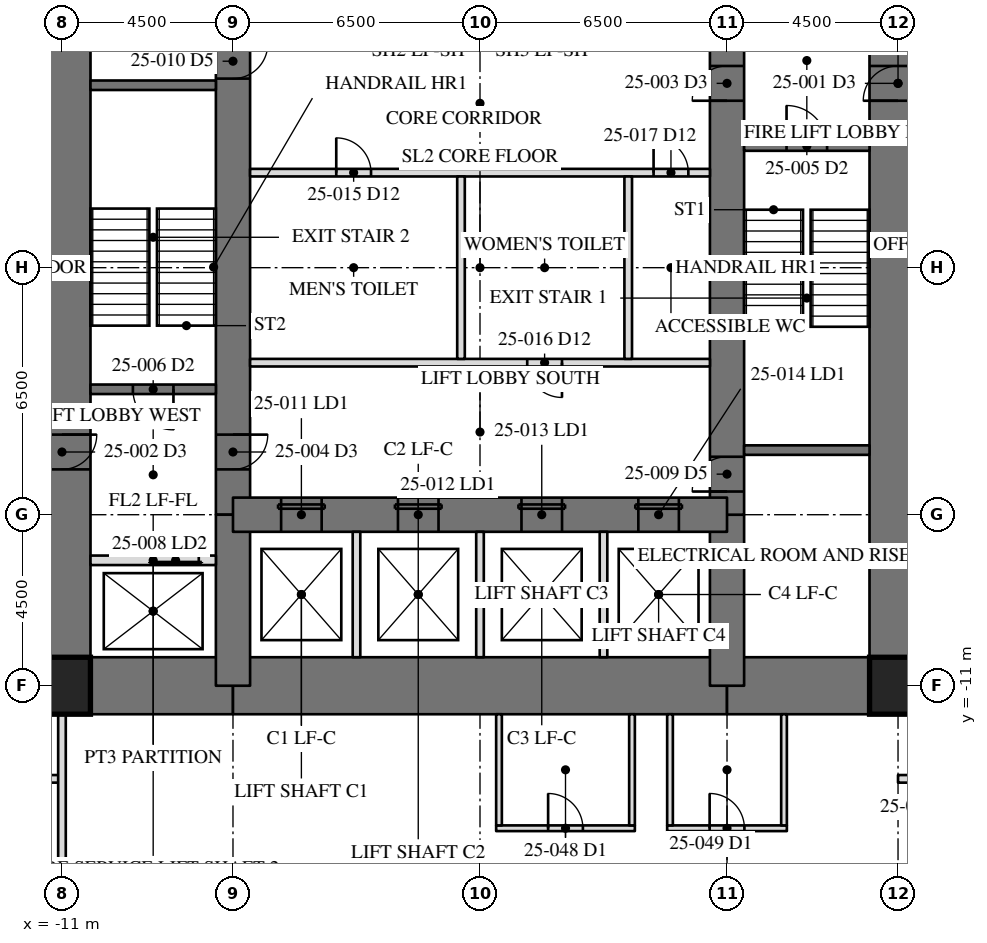
"""IFC4 building model, lengths in metres.
Left out: names, types, materials, properties, quantities, classifications, styles, units other than length and angle.
Written with IfcOpenShell. Run it as: python <this file> out.ifc"""

import sys

from ifc_helpers import new_model, si_unit, direction, frame, frame_2d, origin, origin_2d, place, context, subcontext, project, spatial, rectangle, hollow_rectangle, extrude, element, fill, save


model = new_model("IFC4")
c1 = context("Model", 3, precision=1e-05, world=origin(), true_north=direction((0.0, 1.0)))
c2 = subcontext(c1, "Body", "Model", "MODEL_VIEW")
j1 = project(units=[si_unit("LENGTHUNIT", "METRE"), si_unit("PLANEANGLEUNIT", "RADIAN")], contexts=[c1])
p1 = place(None, origin())
s1 = spatial("IfcSite", under=j1, at=p1, CompositionType="ELEMENT")
p2 = place(p1, origin())
s2 = spatial("IfcBuilding", under=s1, at=p2, CompositionType="ELEMENT")
p3 = place(p2, frame((0.0, 0.0, 109.0)))
s3 = spatial("IfcBuildingStorey", under=s2, at=p3, CompositionType="ELEMENT", Elevation=109.0)
p4 = place(p3, frame((11.0, -11.0, 0.0), z_axis=(0.0, 0.0, 1.0), x_axis=(0.0, 1.0, 0.0)))
e1 = element("IfcWall", 1, at=p4, inside=s3, PredefinedType="SHEAR", context=c2, shape_type="SweptSolid", body=[
    extrude(rectangle(XDim=22.0, YDim=1.5, at=frame_2d((11.0, 0.0))), origin(), (0.0, 0.0, 1.0), 4.1),
])
p5 = place(p4, frame((15.393, 0.0, 0.0)))
e2 = element("IfcOpeningElement", 2, at=p5, cuts=e1, PredefinedType="OPENING", context=c2, shape_type="SweptSolid", body=[
    extrude(rectangle(XDim=0.915, YDim=2.134, at=frame_2d((0.458, 1.067))), frame((0.0, 0.76, 0.0), z_axis=(0.0, -1.0, 0.0), x_axis=(1.0, 0.0, 0.0)), (0.0, 0.0, 1.0), 1.52),
])
p6 = place(p3, frame((-11.0, 11.0, 0.0), z_axis=(0.0, 0.0, 1.0), x_axis=(0.0, -1.0, 0.0)))
e3 = element("IfcWall", 3, at=p6, inside=s3, PredefinedType="SHEAR", context=c2, shape_type="SweptSolid", body=[
    extrude(rectangle(XDim=22.0, YDim=1.5, at=frame_2d((11.0, 0.0))), origin(), (0.0, 0.0, 1.0), 4.1),
])
p7 = place(p6, frame((15.393, 0.0, 0.0)))
e4 = element("IfcOpeningElement", 4, at=p7, cuts=e3, PredefinedType="OPENING", context=c2, shape_type="SweptSolid", body=[
    extrude(rectangle(XDim=0.915, YDim=2.134, at=frame_2d((0.458, 1.067))), frame((0.0, 0.76, 0.0), z_axis=(0.0, -1.0, 0.0), x_axis=(1.0, 0.0, 0.0)), (0.0, 0.0, 1.0), 1.52),
])
p8 = place(p3, frame((-11.0, -11.0, 0.0), z_axis=(0.0, 0.0, 1.0), x_axis=(1.0, 0.0, 0.0)))
e5 = element("IfcWall", 5, at=p8, inside=s3, PredefinedType="SHEAR", context=c2, shape_type="SweptSolid", body=[
    extrude(rectangle(XDim=4.5, YDim=1.5, at=frame_2d((2.25, 0.0))), origin(), (0.0, 0.0, 1.0), 4.1),
])
p9 = place(p3, frame((-6.5, -11.0, 0.0), z_axis=(0.0, 0.0, 1.0), x_axis=(1.0, 0.0, 0.0)))
e6 = element("IfcWall", 6, at=p9, inside=s3, PredefinedType="SHEAR", context=c2, shape_type="SweptSolid", body=[
    extrude(rectangle(XDim=13.0, YDim=1.5, at=frame_2d((6.5, 0.0))), origin(), (0.0, 0.0, 1.0), 4.1),
])
p10 = place(p3, frame((6.5, -11.0, 0.0), z_axis=(0.0, 0.0, 1.0), x_axis=(1.0, 0.0, 0.0)))
e7 = element("IfcWall", 7, at=p10, inside=s3, PredefinedType="SHEAR", context=c2, shape_type="SweptSolid", body=[
    extrude(rectangle(XDim=4.5, YDim=1.5, at=frame_2d((2.25, 0.0))), origin(), (0.0, 0.0, 1.0), 4.1),
])
p11 = place(p3, frame((6.5, -11.0, 0.0), z_axis=(0.0, 0.0, 1.0), x_axis=(0.0, 1.0, 0.0)))
e8 = element("IfcWall", 8, at=p11, inside=s3, PredefinedType="SHEAR", context=c2, shape_type="SweptSolid", body=[
    extrude(rectangle(XDim=4.5, YDim=0.9, at=frame_2d((2.25, 0.0))), origin(), (0.0, 0.0, 1.0), 4.1),
])
p12 = place(p3, frame((6.5, -6.5, 0.0), z_axis=(0.0, 0.0, 1.0), x_axis=(0.0, 1.0, 0.0)))
e9 = element("IfcWall", 9, at=p12, inside=s3, PredefinedType="SHEAR", context=c2, shape_type="SweptSolid", body=[
    extrude(rectangle(XDim=13.0, YDim=0.9, at=frame_2d((6.5, 0.0))), origin(), (0.0, 0.0, 1.0), 4.1),
])
p13 = place(p12, frame((10.893, 0.0, 0.0)))
e10 = element("IfcOpeningElement", 10, at=p13, cuts=e9, PredefinedType="OPENING", context=c2, shape_type="SweptSolid", body=[
    extrude(rectangle(XDim=0.915, YDim=2.134, at=frame_2d((0.458, 1.067))), frame((0.0, 0.46, 0.0), z_axis=(0.0, -1.0, 0.0), x_axis=(1.0, 0.0, 0.0)), (0.0, 0.0, 1.0), 0.92),
])
p14 = place(p12, frame((0.61, 0.0, 0.0)))
e11 = element("IfcOpeningElement", 11, at=p14, cuts=e9, PredefinedType="OPENING", context=c2, shape_type="SweptSolid", body=[
    extrude(rectangle(XDim=0.915, YDim=2.134, at=frame_2d((0.458, 1.067))), frame((0.0, 0.46, 0.0), z_axis=(0.0, -1.0, 0.0), x_axis=(1.0, 0.0, 0.0)), (0.0, 0.0, 1.0), 0.92),
])
p15 = place(p3, frame((-6.5, 6.5, 0.0), z_axis=(0.0, 0.0, 1.0), x_axis=(0.0, -1.0, 0.0)))
e12 = element("IfcWall", 12, at=p15, inside=s3, PredefinedType="SHEAR", context=c2, shape_type="SweptSolid", body=[
    extrude(rectangle(XDim=13.0, YDim=0.9, at=frame_2d((6.5, 0.0))), origin(), (0.0, 0.0, 1.0), 4.1),
])
p16 = place(p15, frame((10.893, 0.0, 0.0)))
e13 = element("IfcOpeningElement", 13, at=p16, cuts=e12, PredefinedType="OPENING", context=c2, shape_type="SweptSolid", body=[
    extrude(rectangle(XDim=0.915, YDim=2.134, at=frame_2d((0.458, 1.067))), frame((0.0, 0.46, 0.0), z_axis=(0.0, -1.0, 0.0), x_axis=(1.0, 0.0, 0.0)), (0.0, 0.0, 1.0), 0.92),
])
p17 = place(p15, frame((0.61, 0.0, 0.0)))
e14 = element("IfcOpeningElement", 14, at=p17, cuts=e12, PredefinedType="OPENING", context=c2, shape_type="SweptSolid", body=[
    extrude(rectangle(XDim=0.915, YDim=2.134, at=frame_2d((0.458, 1.067))), frame((0.0, 0.46, 0.0), z_axis=(0.0, -1.0, 0.0), x_axis=(1.0, 0.0, 0.0)), (0.0, 0.0, 1.0), 0.92),
])
p18 = place(p3, frame((-6.5, -6.5, 0.0), z_axis=(0.0, 0.0, 1.0), x_axis=(0.0, -1.0, 0.0)))
e15 = element("IfcWall", 15, at=p18, inside=s3, PredefinedType="SHEAR", context=c2, shape_type="SweptSolid", body=[
    extrude(rectangle(XDim=4.5, YDim=0.9, at=frame_2d((2.25, 0.0))), origin(), (0.0, 0.0, 1.0), 4.1),
])
p19 = place(p3, frame((-6.5, -6.5, 0.0), z_axis=(0.0, 0.0, 1.0), x_axis=(1.0, 0.0, 0.0)))
e16 = element("IfcWall", 16, at=p19, inside=s3, PredefinedType="SHEAR", context=c2, shape_type="SweptSolid", body=[
    extrude(rectangle(XDim=13.0, YDim=0.9, at=frame_2d((6.5, 0.0))), origin(), (0.0, 0.0, 1.0), 4.1),
])
p20 = place(p19, frame((1.267, 0.0, 0.0)))
e17 = element("IfcOpeningElement", 17, at=p20, cuts=e16, PredefinedType="OPENING", context=c2, shape_type="SweptSolid", body=[
    extrude(rectangle(XDim=1.067, YDim=2.134, at=frame_2d((0.533, 1.067))), frame((0.0, 0.46, 0.0), z_axis=(0.0, -1.0, 0.0), x_axis=(1.0, 0.0, 0.0)), (0.0, 0.0, 1.0), 0.92),
])
p21 = place(p19, frame((4.342, 0.0, 0.0)))
e18 = element("IfcOpeningElement", 18, at=p21, cuts=e16, PredefinedType="OPENING", context=c2, shape_type="SweptSolid", body=[
    extrude(rectangle(XDim=1.067, YDim=2.134, at=frame_2d((0.533, 1.067))), frame((0.0, 0.46, 0.0), z_axis=(0.0, -1.0, 0.0), x_axis=(1.0, 0.0, 0.0)), (0.0, 0.0, 1.0), 0.92),
])
p22 = place(p19, frame((7.592, 0.0, 0.0)))
e19 = element("IfcOpeningElement", 19, at=p22, cuts=e16, PredefinedType="OPENING", context=c2, shape_type="SweptSolid", body=[
    extrude(rectangle(XDim=1.067, YDim=2.134, at=frame_2d((0.533, 1.067))), frame((0.0, 0.46, 0.0), z_axis=(0.0, -1.0, 0.0), x_axis=(1.0, 0.0, 0.0)), (0.0, 0.0, 1.0), 0.92),
])
p23 = place(p19, frame((10.667, 0.0, 0.0)))
e20 = element("IfcOpeningElement", 20, at=p23, cuts=e16, PredefinedType="OPENING", context=c2, shape_type="SweptSolid", body=[
    extrude(rectangle(XDim=1.067, YDim=2.134, at=frame_2d((0.533, 1.067))), frame((0.0, 0.46, 0.0), z_axis=(0.0, -1.0, 0.0), x_axis=(1.0, 0.0, 0.0)), (0.0, 0.0, 1.0), 0.92),
])
for number, where, z_axis, x_axis in (
    (21, (-11.0, -11.0, 0.0), (0.0, 0.0, 1.0), (1.0, 0.0, 0.0)),
    (22, (11.0, -11.0, 0.0), (0.0, 0.0, 1.0), (1.0, 0.0, 0.0)),
):
    element("IfcColumn", number, at=place(p3, frame(where, z_axis=z_axis, x_axis=x_axis)), inside=s3, PredefinedType="COLUMN", context=c2, shape_type="SweptSolid", body=[
        extrude(hollow_rectangle(XDim=1.499, YDim=1.499, WallThickness=0.102, at=origin_2d()), origin(), (0.0, 0.0, 1.0), 4.1),
    ])
for number, where, z_axis, x_axis in (
    (23, (6.95, -4.8, 0.0), (0.0, 0.0, 1.0), (1.0, 0.0, 0.0)),
    (24, (-6.95, 4.8, 0.0), (0.0, 0.0, 1.0), (-1.0, 0.0, 0.0)),
):
    element("IfcWall", number, at=place(p3, frame(where, z_axis=z_axis, x_axis=x_axis)), inside=s3, PredefinedType="SOLIDWALL", context=c2, shape_type="SweptSolid", body=[
        extrude(rectangle(XDim=3.3, YDim=0.25, at=frame_2d((1.65, 0.0))), origin(), (0.0, 0.0, 1.0), 3.91),
    ])
p24 = place(p3, frame((6.95, 3.2, 0.0), z_axis=(0.0, 0.0, 1.0), x_axis=(1.0, 0.0, 0.0)))
e25 = element("IfcWall", 25, at=p24, inside=s3, PredefinedType="SOLIDWALL", context=c2, shape_type="SweptSolid", body=[
    extrude(rectangle(XDim=3.3, YDim=0.25, at=frame_2d((1.65, 0.0))), origin(), (0.0, 0.0, 1.0), 3.91),
])
p25 = place(p24, frame((1.116, 0.0, 0.0)))
e26 = element("IfcOpeningElement", 26, at=p25, cuts=e25, PredefinedType="OPENING", context=c2, shape_type="SweptSolid", body=[
    extrude(rectangle(XDim=1.067, YDim=2.134, at=frame_2d((0.533, 1.067))), frame((0.0, 0.135, 0.0), z_axis=(0.0, -1.0, 0.0), x_axis=(1.0, 0.0, 0.0)), (0.0, 0.0, 1.0), 0.27),
])
p26 = place(p3, frame((-6.95, -3.2, 0.0), z_axis=(0.0, 0.0, 1.0), x_axis=(-1.0, 0.0, 0.0)))
e27 = element("IfcWall", 27, at=p26, inside=s3, PredefinedType="SOLIDWALL", context=c2, shape_type="SweptSolid", body=[
    extrude(rectangle(XDim=3.3, YDim=0.25, at=frame_2d((1.65, 0.0))), origin(), (0.0, 0.0, 1.0), 3.91),
])
p27 = place(p26, frame((1.116, 0.0, 0.0)))
e28 = element("IfcOpeningElement", 28, at=p27, cuts=e27, PredefinedType="OPENING", context=c2, shape_type="SweptSolid", body=[
    extrude(rectangle(XDim=1.067, YDim=2.134, at=frame_2d((0.533, 1.067))), frame((0.0, 0.135, 0.0), z_axis=(0.0, -1.0, 0.0), x_axis=(1.0, 0.0, 0.0)), (0.0, 0.0, 1.0), 0.27),
])
p28 = place(p3, frame((-6.95, -7.7, 0.0), z_axis=(0.0, 0.0, 1.0), x_axis=(-1.0, 0.0, 0.0)))
e29 = element("IfcWall", 29, at=p28, inside=s3, PredefinedType="PARTITIONING", context=c2, shape_type="SweptSolid", body=[
    extrude(rectangle(XDim=3.3, YDim=0.25, at=frame_2d((1.65, 0.0))), origin(), (0.0, 0.0, 1.0), 3.91),
])
p29 = place(p28, frame((0.45, 0.0, 0.0)))
e30 = element("IfcOpeningElement", 30, at=p29, cuts=e29, PredefinedType="OPENING", context=c2, shape_type="SweptSolid", body=[
    extrude(rectangle(XDim=1.219, YDim=2.134, at=frame_2d((0.609, 1.067))), frame((0.0, 0.135, 0.0), z_axis=(0.0, -1.0, 0.0), x_axis=(1.0, 0.0, 0.0)), (0.0, 0.0, 1.0), 0.27),
])
p30 = place(p3, frame((-6.05, 2.5, 0.0), z_axis=(0.0, 0.0, 1.0), x_axis=(1.0, 0.0, 0.0)))
e31 = element("IfcWall", 31, at=p30, inside=s3, PredefinedType="PARTITIONING", context=c2, shape_type="SweptSolid", body=[
    extrude(rectangle(XDim=12.1, YDim=0.2, at=frame_2d((6.05, 0.0))), origin(), (0.0, 0.0, 1.0), 3.91),
])
p31 = place(p30, frame((2.268, 0.0, 0.0)))
e32 = element("IfcOpeningElement", 32, at=p31, cuts=e31, PredefinedType="OPENING", context=c2, shape_type="SweptSolid", body=[
    extrude(rectangle(XDim=0.915, YDim=2.134, at=frame_2d((0.458, 1.067))), frame((0.0, 0.11, 0.0), z_axis=(0.0, -1.0, 0.0), x_axis=(1.0, 0.0, 0.0)), (0.0, 0.0, 1.0), 0.22),
])
p32 = place(p30, frame((10.617, 0.0, 0.0)))
e33 = element("IfcOpeningElement", 33, at=p32, cuts=e31, PredefinedType="OPENING", context=c2, shape_type="SweptSolid", body=[
    extrude(rectangle(XDim=0.915, YDim=2.134, at=frame_2d((0.458, 1.067))), frame((0.0, 0.11, 0.0), z_axis=(0.0, -1.0, 0.0), x_axis=(1.0, 0.0, 0.0)), (0.0, 0.0, 1.0), 0.22),
])
p33 = place(p3, frame((6.05, -2.5, 0.0), z_axis=(0.0, 0.0, 1.0), x_axis=(-1.0, 0.0, 0.0)))
e34 = element("IfcWall", 34, at=p33, inside=s3, PredefinedType="PARTITIONING", context=c2, shape_type="SweptSolid", body=[
    extrude(rectangle(XDim=12.1, YDim=0.2, at=frame_2d((6.05, 0.0))), origin(), (0.0, 0.0, 1.0), 3.91),
])
p34 = place(p33, frame((3.893, 0.0, 0.0)))
e35 = element("IfcOpeningElement", 35, at=p34, cuts=e34, PredefinedType="OPENING", context=c2, shape_type="SweptSolid", body=[
    extrude(rectangle(XDim=0.915, YDim=2.134, at=frame_2d((0.458, 1.067))), frame((0.0, 0.11, 0.0), z_axis=(0.0, -1.0, 0.0), x_axis=(1.0, 0.0, 0.0)), (0.0, 0.0, 1.0), 0.22),
])
for number, where, z_axis, x_axis in (
    (36, (-3.25, -10.25, 0.0), (0.0, 0.0, 1.0), (0.0, 1.0, 0.0)),
    (37, (0.0, -10.25, 0.0), (0.0, 0.0, 1.0), (0.0, 1.0, 0.0)),
    (38, (3.25, -10.25, 0.0), (0.0, 0.0, 1.0), (0.0, 1.0, 0.0)),
):
    element("IfcWall", number, at=place(p3, frame(where, z_axis=z_axis, x_axis=x_axis)), inside=s3, PredefinedType="PARTITIONING", context=c2, shape_type="SweptSolid", body=[
        extrude(rectangle(XDim=3.3, YDim=0.2, at=frame_2d((1.65, 0.0))), origin(), (0.0, 0.0, 1.0), 3.91),
    ])
for number, where, z_axis, x_axis in (
    (39, (-0.5, -2.4, 0.0), (0.0, 0.0, 1.0), (0.0, 1.0, 0.0)),
    (40, (3.9, -2.4, 0.0), (0.0, 0.0, 1.0), (0.0, 1.0, 0.0)),
):
    element("IfcWall", number, at=place(p3, frame(where, z_axis=z_axis, x_axis=x_axis)), inside=s3, PredefinedType="PARTITIONING", context=c2, shape_type="SweptSolid", body=[
        extrude(rectangle(XDim=4.8, YDim=0.2, at=frame_2d((2.4, 0.0))), origin(), (0.0, 0.0, 1.0), 3.91),
    ])
for number, where, z_axis, x_axis in (
    (41, (11.0, -13.45, 0.0), (0.0, 0.0, 1.0), (1.0, 0.0, 0.0)),
    (42, (-11.0, -13.45, 0.0), (0.0, 0.0, 1.0), (-1.0, 0.0, 0.0)),
):
    element("IfcWall", number, at=place(p3, frame(where, z_axis=z_axis, x_axis=x_axis)), inside=s3, PredefinedType="PARTITIONING", context=c2, shape_type="SweptSolid", body=[
        extrude(rectangle(XDim=2.55, YDim=0.2, at=frame_2d((1.275, 0.0))), origin(), (0.0, 0.0, 1.0), 3.91),
    ])
p35 = place(p3, frame((-11.0, -11.75, 0.0), z_axis=(0.0, 0.0, 1.0), x_axis=(0.0, -1.0, 0.0)))
e43 = element("IfcWall", 43, at=p35, inside=s3, PredefinedType="PARTITIONING", context=c2, shape_type="SweptSolid", body=[
    extrude(rectangle(XDim=10.665, YDim=0.2, at=frame_2d((5.333, 0.0))), origin(), (0.0, 0.0, 1.0), 3.326),
])
p36 = place(p3, frame((0.425, -14.75, 0.0), z_axis=(0.0, 0.0, 1.0), x_axis=(1.0, 0.0, 0.0)))
e44 = element("IfcWall", 44, at=p36, inside=s3, PredefinedType="PARTITIONING", context=c2, shape_type="SweptSolid", body=[
    extrude(rectangle(XDim=3.65, YDim=0.15, at=frame_2d((1.825, 0.0))), origin(), (0.0, 0.0, 1.0), 3.91),
])
p37 = place(p36, frame((1.367, 0.0, 0.0)))
e45 = element("IfcOpeningElement", 45, at=p37, cuts=e44, PredefinedType="OPENING", context=c2, shape_type="SweptSolid", body=[
    extrude(rectangle(XDim=0.915, YDim=2.134, at=frame_2d((0.458, 1.067))), frame((0.0, 0.085, 0.0), z_axis=(0.0, -1.0, 0.0), x_axis=(1.0, 0.0, 0.0)), (0.0, 0.0, 1.0), 0.17),
])
for number, where, z_axis, x_axis in (
    (46, (0.5, -14.675, 0.0), (0.0, 0.0, 1.0), (0.0, 1.0, 0.0)),
    (47, (4.0, -14.675, 0.0), (0.0, 0.0, 1.0), (0.0, 1.0, 0.0)),
):
    element("IfcWall", number, at=place(p3, frame(where, z_axis=z_axis, x_axis=x_axis)), inside=s3, PredefinedType="PARTITIONING", context=c2, shape_type="SweptSolid", body=[
        extrude(rectangle(XDim=2.925, YDim=0.15, at=frame_2d((1.462, 0.0))), origin(), (0.0, 0.0, 1.0), 3.91),
    ])
p38 = place(p3, frame((4.925, -14.75, 0.0), z_axis=(0.0, 0.0, 1.0), x_axis=(1.0, 0.0, 0.0)))
e48 = element("IfcWall", 48, at=p38, inside=s3, PredefinedType="PARTITIONING", context=c2, shape_type="SweptSolid", body=[
    extrude(rectangle(XDim=3.15, YDim=0.15, at=frame_2d((1.575, 0.0))), origin(), (0.0, 0.0, 1.0), 3.91),
])
p39 = place(p38, frame((1.117, 0.0, 0.0)))
e49 = element("IfcOpeningElement", 49, at=p39, cuts=e48, PredefinedType="OPENING", context=c2, shape_type="SweptSolid", body=[
    extrude(rectangle(XDim=0.915, YDim=2.134, at=frame_2d((0.458, 1.067))), frame((0.0, 0.085, 0.0), z_axis=(0.0, -1.0, 0.0), x_axis=(1.0, 0.0, 0.0)), (0.0, 0.0, 1.0), 0.17),
])
for number, where, z_axis, x_axis in (
    (50, (5.0, -14.675, 0.0), (0.0, 0.0, 1.0), (0.0, 1.0, 0.0)),
    (51, (8.0, -14.675, 0.0), (0.0, 0.0, 1.0), (0.0, 1.0, 0.0)),
):
    element("IfcWall", number, at=place(p3, frame(where, z_axis=z_axis, x_axis=x_axis)), inside=s3, PredefinedType="PARTITIONING", context=c2, shape_type="SweptSolid", body=[
        extrude(rectangle(XDim=2.925, YDim=0.15, at=frame_2d((1.462, 0.0))), origin(), (0.0, 0.0, 1.0), 3.91),
    ])
p40 = place(p13, origin())
e52 = element("IfcDoor", 52, at=p40, inside=s3, OperationType="SINGLE_SWING_RIGHT", PredefinedType="DOOR", context=c2, shape_type="SweptSolid", body=[
    extrude(rectangle(XDim=0.915, YDim=2.134, at=frame_2d((0.458, 1.067))), frame((0.0, -0.375, 0.0), z_axis=(0.0, -1.0, 0.0), x_axis=(1.0, 0.0, 0.0)), (0.0, 0.0, 1.0), 0.05),
])
fill(e10, e52)
p41 = place(p16, origin())
e53 = element("IfcDoor", 53, at=p41, inside=s3, OperationType="SINGLE_SWING_RIGHT", PredefinedType="DOOR", context=c2, shape_type="SweptSolid", body=[
    extrude(rectangle(XDim=0.915, YDim=2.134, at=frame_2d((0.458, 1.067))), frame((0.0, -0.375, 0.0), z_axis=(0.0, -1.0, 0.0), x_axis=(1.0, 0.0, 0.0)), (0.0, 0.0, 1.0), 0.05),
])
fill(e13, e53)
p42 = place(p25, origin())
e54 = element("IfcDoor", 54, at=p42, inside=s3, OperationType="SINGLE_SWING_LEFT", PredefinedType="DOOR", context=c2, shape_type="SweptSolid", body=[
    extrude(rectangle(XDim=1.067, YDim=2.134, at=frame_2d((0.533, 1.067))), frame((0.0, 0.025, 0.0), z_axis=(0.0, -1.0, 0.0), x_axis=(1.0, 0.0, 0.0)), (0.0, 0.0, 1.0), 0.05),
])
fill(e26, e54)
p43 = place(p27, origin())
e55 = element("IfcDoor", 55, at=p43, inside=s3, OperationType="SINGLE_SWING_LEFT", PredefinedType="DOOR", context=c2, shape_type="SweptSolid", body=[
    extrude(rectangle(XDim=1.067, YDim=2.134, at=frame_2d((0.533, 1.067))), frame((0.0, 0.025, 0.0), z_axis=(0.0, -1.0, 0.0), x_axis=(1.0, 0.0, 0.0)), (0.0, 0.0, 1.0), 0.05),
])
fill(e28, e55)
p44 = place(p29, origin())
e56 = element("IfcDoor", 56, at=p44, inside=s3, OperationType="SLIDING_TO_LEFT", PredefinedType="DOOR", context=c2, shape_type="SweptSolid", body=[
    extrude(rectangle(XDim=1.219, YDim=2.134, at=frame_2d((0.609, 1.067))), frame((0.0, 0.025, 0.0), z_axis=(0.0, -1.0, 0.0), x_axis=(1.0, 0.0, 0.0)), (0.0, 0.0, 1.0), 0.05),
])
fill(e30, e56)
p45 = place(p14, origin())
e57 = element("IfcDoor", 57, at=p45, inside=s3, OperationType="SINGLE_SWING_RIGHT", PredefinedType="DOOR", context=c2, shape_type="SweptSolid", body=[
    extrude(rectangle(XDim=0.915, YDim=2.134, at=frame_2d((0.458, 1.067))), frame((0.0, -0.375, 0.0), z_axis=(0.0, -1.0, 0.0), x_axis=(1.0, 0.0, 0.0)), (0.0, 0.0, 1.0), 0.05),
])
fill(e11, e57)
p46 = place(p17, origin())
e58 = element("IfcDoor", 58, at=p46, inside=s3, OperationType="SINGLE_SWING_RIGHT", PredefinedType="DOOR", context=c2, shape_type="SweptSolid", body=[
    extrude(rectangle(XDim=0.915, YDim=2.134, at=frame_2d((0.458, 1.067))), frame((0.0, -0.375, 0.0), z_axis=(0.0, -1.0, 0.0), x_axis=(1.0, 0.0, 0.0)), (0.0, 0.0, 1.0), 0.05),
])
fill(e14, e58)
p47 = place(p20, origin())
e59 = element("IfcDoor", 59, at=p47, inside=s3, OperationType="SLIDING_TO_LEFT", PredefinedType="DOOR", context=c2, shape_type="SweptSolid", body=[
    extrude(rectangle(XDim=1.067, YDim=2.134, at=frame_2d((0.533, 1.067))), frame((0.0, -0.375, 0.0), z_axis=(0.0, -1.0, 0.0), x_axis=(1.0, 0.0, 0.0)), (0.0, 0.0, 1.0), 0.05),
])
fill(e17, e59)
p48 = place(p21, origin())
e60 = element("IfcDoor", 60, at=p48, inside=s3, OperationType="SLIDING_TO_LEFT", PredefinedType="DOOR", context=c2, shape_type="SweptSolid", body=[
    extrude(rectangle(XDim=1.067, YDim=2.134, at=frame_2d((0.533, 1.067))), frame((0.0, -0.375, 0.0), z_axis=(0.0, -1.0, 0.0), x_axis=(1.0, 0.0, 0.0)), (0.0, 0.0, 1.0), 0.05),
])
fill(e18, e60)
p49 = place(p22, origin())
e61 = element("IfcDoor", 61, at=p49, inside=s3, OperationType="SLIDING_TO_LEFT", PredefinedType="DOOR", context=c2, shape_type="SweptSolid", body=[
    extrude(rectangle(XDim=1.067, YDim=2.134, at=frame_2d((0.533, 1.067))), frame((0.0, -0.375, 0.0), z_axis=(0.0, -1.0, 0.0), x_axis=(1.0, 0.0, 0.0)), (0.0, 0.0, 1.0), 0.05),
])
fill(e19, e61)
p50 = place(p23, origin())
e62 = element("IfcDoor", 62, at=p50, inside=s3, OperationType="SLIDING_TO_LEFT", PredefinedType="DOOR", context=c2, shape_type="SweptSolid", body=[
    extrude(rectangle(XDim=1.067, YDim=2.134, at=frame_2d((0.533, 1.067))), frame((0.0, -0.375, 0.0), z_axis=(0.0, -1.0, 0.0), x_axis=(1.0, 0.0, 0.0)), (0.0, 0.0, 1.0), 0.05),
])
fill(e20, e62)
p51 = place(p31, origin())
e63 = element("IfcDoor", 63, at=p51, inside=s3, OperationType="SINGLE_SWING_LEFT", PredefinedType="DOOR", context=c2, shape_type="SweptSolid", body=[
    extrude(rectangle(XDim=0.915, YDim=2.134, at=frame_2d((0.458, 1.067))), frame((0.0, 0.025, 0.0), z_axis=(0.0, -1.0, 0.0), x_axis=(1.0, 0.0, 0.0)), (0.0, 0.0, 1.0), 0.05),
])
fill(e32, e63)
p52 = place(p34, origin())
e64 = element("IfcDoor", 64, at=p52, inside=s3, OperationType="SINGLE_SWING_LEFT", PredefinedType="DOOR", context=c2, shape_type="SweptSolid", body=[
    extrude(rectangle(XDim=0.915, YDim=2.134, at=frame_2d((0.458, 1.067))), frame((0.0, 0.025, 0.0), z_axis=(0.0, -1.0, 0.0), x_axis=(1.0, 0.0, 0.0)), (0.0, 0.0, 1.0), 0.05),
])
fill(e35, e64)
p53 = place(p32, origin())
e65 = element("IfcDoor", 65, at=p53, inside=s3, OperationType="SINGLE_SWING_LEFT", PredefinedType="DOOR", context=c2, shape_type="SweptSolid", body=[
    extrude(rectangle(XDim=0.915, YDim=2.134, at=frame_2d((0.458, 1.067))), frame((0.0, 0.025, 0.0), z_axis=(0.0, -1.0, 0.0), x_axis=(1.0, 0.0, 0.0)), (0.0, 0.0, 1.0), 0.05),
])
fill(e33, e65)
p54 = place(p37, origin())
e66 = element("IfcDoor", 66, at=p54, inside=s3, OperationType="SINGLE_SWING_LEFT", PredefinedType="DOOR", context=c2, shape_type="SweptSolid", body=[
    extrude(rectangle(XDim=0.915, YDim=2.134, at=frame_2d((0.458, 1.067))), frame((0.0, 0.025, 0.0), z_axis=(0.0, -1.0, 0.0), x_axis=(1.0, 0.0, 0.0)), (0.0, 0.0, 1.0), 0.05),
])
fill(e45, e66)
p55 = place(p39, origin())
e67 = element("IfcDoor", 67, at=p55, inside=s3, OperationType="SINGLE_SWING_LEFT", PredefinedType="DOOR", context=c2, shape_type="SweptSolid", body=[
    extrude(rectangle(XDim=0.915, YDim=2.134, at=frame_2d((0.458, 1.067))), frame((0.0, 0.025, 0.0), z_axis=(0.0, -1.0, 0.0), x_axis=(1.0, 0.0, 0.0)), (0.0, 0.0, 1.0), 0.05),
])
fill(e49, e67)
save(model, sys.argv[1])
